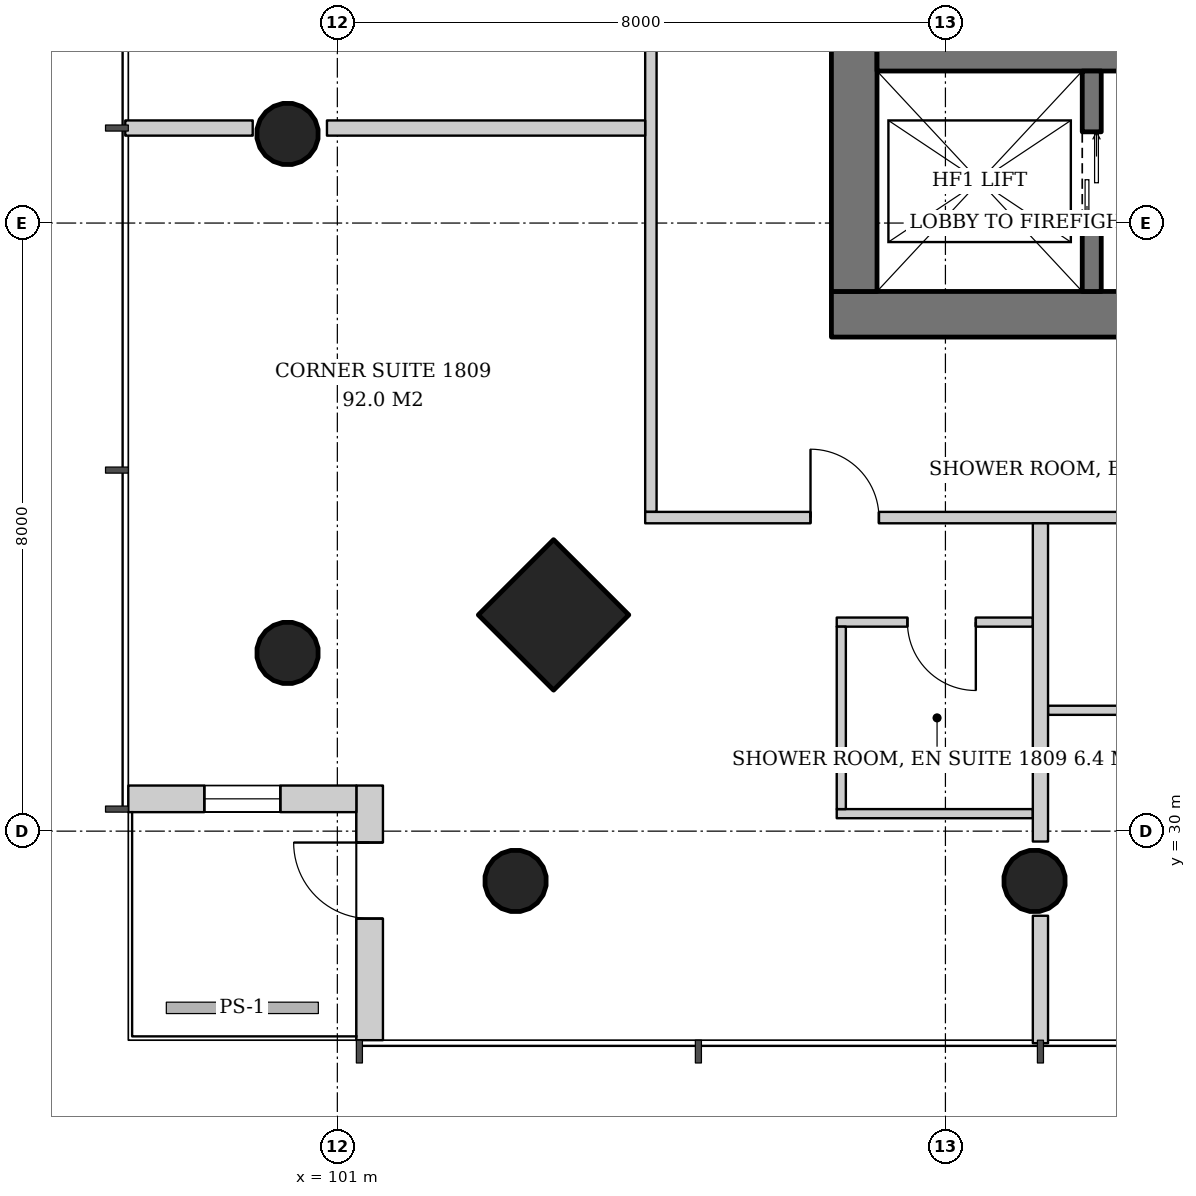
"""IFC4 building model, lengths in metres.
Left out: names, types, materials, properties, quantities, classifications, styles, units other than length and angle.
Written with IfcOpenShell. Run it as: python <this file> out.ifc"""

import sys

from ifc_helpers import new_model, si_unit, direction, frame, frame_2d, origin, origin_2d, place, context, subcontext, project, spatial, rectangle, hollow_circle, extrude, element, fill, save


model = new_model("IFC4")
c1 = context("Model", 3, precision=1e-05, world=origin(), true_north=direction((0.0, 1.0)))
c2 = subcontext(c1, "Body", "Model", "MODEL_VIEW")
j1 = project(units=[si_unit("LENGTHUNIT", "METRE"), si_unit("PLANEANGLEUNIT", "RADIAN")], contexts=[c1])
p1 = place(None, origin())
s1 = spatial("IfcSite", under=j1, at=p1, CompositionType="ELEMENT")
p2 = place(p1, origin())
s2 = spatial("IfcBuilding", under=s1, at=p2, CompositionType="ELEMENT")
p3 = place(p2, frame((0.0, 0.0, 74.2)))
s3 = spatial("IfcBuildingStorey", under=s2, at=p3, CompositionType="ELEMENT", Elevation=74.2)
p4 = place(p3, frame((103.793, 32.793, 0.0), z_axis=(0.042965756413, 0.042965756413, 0.998152236661), x_axis=(-0.707106781187, 0.707106781187, 0.0)))
e1 = element("IfcColumn", 1, at=p4, inside=s3, PredefinedType="COLUMN", context=c2, shape_type="SweptSolid", body=[
    extrude(rectangle(XDim=1.4, YDim=1.4, at=origin_2d()), origin(), (0.0, 0.0, 1.0), 3.807),
])
p5 = place(p3, frame((100.293, 32.293, 0.0), z_axis=(0.042965756413, 0.042965756413, 0.998152236661), x_axis=(-0.707106781187, 0.707106781187, 0.0)))
e2 = element("IfcColumn", 2, at=p5, inside=s3, PredefinedType="COLUMN", context=c2, shape_type="SweptSolid", body=[
    extrude(hollow_circle(Radius=0.406, WallThickness=0.03, at=origin_2d()), origin(), (0.0, 0.0, 1.0), 3.807),
])
p6 = place(p3, frame((100.293, 39.146, 0.0), z_axis=(0.042995471882, 0.021561908287, 0.998842566929), x_axis=(-0.448280611873, 0.89389288677, 0.0)))
e3 = element("IfcColumn", 3, at=p6, inside=s3, PredefinedType="COLUMN", context=c2, shape_type="SweptSolid", body=[
    extrude(hollow_circle(Radius=0.406, WallThickness=0.03, at=origin_2d()), origin(), (0.0, 0.0, 1.0), 3.804),
])
p7 = place(p3, frame((103.293, 29.293, 0.0), z_axis=(0.042965756413, 0.042965756413, 0.998152236661), x_axis=(-0.707106781187, 0.707106781187, 0.0)))
e4 = element("IfcColumn", 4, at=p7, inside=s3, PredefinedType="COLUMN", context=c2, shape_type="SweptSolid", body=[
    extrude(hollow_circle(Radius=0.406, WallThickness=0.03, at=origin_2d()), origin(), (0.0, 0.0, 1.0), 3.807),
])
p8 = place(p3, frame((110.146, 29.293, 0.0), z_axis=(0.021561908287, 0.042995471882, 0.998842566929), x_axis=(-0.89389288677, 0.448280611873, 0.0)))
e5 = element("IfcColumn", 5, at=p8, inside=s3, PredefinedType="COLUMN", context=c2, shape_type="SweptSolid", body=[
    extrude(hollow_circle(Radius=0.406, WallThickness=0.03, at=origin_2d()), origin(), (0.0, 0.0, 1.0), 3.804),
])
p9 = place(p3, frame((107.5, 36.8, 0.0), z_axis=(0.0, 0.0, 1.0), x_axis=(1.0, 0.0, 0.0)))
e6 = element("IfcWall", 6, at=p9, inside=s3, PredefinedType="SHEAR", context=c2, shape_type="SweptSolid", body=[
    extrude(rectangle(XDim=19.0, YDim=0.6, at=frame_2d((9.5, 0.0))), origin(), (0.0, 0.0, 1.0), 3.8),
])
p10 = place(p9, frame((3.9, 0.0, 0.0)))
e7 = element("IfcOpeningElement", 7, at=p10, cuts=e6, PredefinedType="OPENING", context=c2, shape_type="SweptSolid", body=[
    extrude(rectangle(XDim=1.0, YDim=2.1, at=frame_2d((0.5, 1.05))), frame((0.0, 0.31, 0.0), z_axis=(0.0, -1.0, 0.0), x_axis=(1.0, 0.0, 0.0)), (0.0, 0.0, 1.0), 0.62),
])
p11 = place(p9, frame((14.153, 0.0, 0.0)))
e8 = element("IfcOpeningElement", 8, at=p11, cuts=e6, PredefinedType="OPENING", context=c2, shape_type="SweptSolid", body=[
    extrude(rectangle(XDim=1.0, YDim=2.1, at=frame_2d((0.5, 1.05))), frame((0.0, 0.31, 0.0), z_axis=(0.0, -1.0, 0.0), x_axis=(1.0, 0.0, 0.0)), (0.0, 0.0, 1.0), 0.62),
])
p12 = place(p9, frame((16.2, 0.0, 0.0)))
e9 = element("IfcOpeningElement", 9, at=p12, cuts=e6, PredefinedType="OPENING", context=c2, shape_type="SweptSolid", body=[
    extrude(rectangle(XDim=1.0, YDim=2.1, at=frame_2d((0.5, 1.05))), frame((0.0, 0.31, 0.0), z_axis=(0.0, -1.0, 0.0), x_axis=(1.0, 0.0, 0.0)), (0.0, 0.0, 1.0), 0.62),
])
p13 = place(p3, frame((107.8, 37.1, 0.0), z_axis=(0.0, 0.0, 1.0), x_axis=(0.0, 1.0, 0.0)))
e10 = element("IfcWall", 10, at=p13, inside=s3, PredefinedType="SHEAR", context=c2, shape_type="SweptSolid", body=[
    extrude(rectangle(XDim=17.8, YDim=0.6, at=frame_2d((8.9, 0.0))), origin(), (0.0, 0.0, 1.0), 3.8),
])
p14 = place(p13, frame((8.0, 0.0, 0.0)))
e11 = element("IfcOpeningElement", 11, at=p14, cuts=e10, PredefinedType="OPENING", context=c2, shape_type="SweptSolid", body=[
    extrude(rectangle(XDim=1.8, YDim=2.4, at=frame_2d((0.9, 1.2))), frame((0.0, 0.31, 0.0), z_axis=(0.0, -1.0, 0.0), x_axis=(1.0, 0.0, 0.0)), (0.0, 0.0, 1.0), 0.62),
])
p15 = place(p3, frame((108.1, 40.2, 0.0), z_axis=(0.0, 0.0, 1.0), x_axis=(1.0, 0.0, 0.0)))
e12 = element("IfcWall", 12, at=p15, inside=s3, PredefinedType="SHEAR", context=c2, shape_type="SweptSolid", body=[
    extrude(rectangle(XDim=17.8, YDim=0.4, at=frame_2d((8.9, 0.0))), origin(), (0.0, 0.0, 1.0), 3.8),
])
p16 = place(p3, frame((101.425, 27.25, 0.0), z_axis=(0.0, 0.0, 1.0), x_axis=(0.0, 1.0, 0.0)))
e13 = element("IfcWall", 13, at=p16, inside=s3, PredefinedType="SOLIDWALL", context=c2, shape_type="SweptSolid", body=[
    extrude(rectangle(XDim=3.35, YDim=0.35, at=frame_2d((1.675, 0.0))), origin(), (0.0, 0.0, 1.0), 3.6),
])
p17 = place(p16, frame((1.6, 0.0, 0.0)))
e14 = element("IfcOpeningElement", 14, at=p17, cuts=e13, PredefinedType="OPENING", context=c2, shape_type="SweptSolid", body=[
    extrude(rectangle(XDim=1.0, YDim=2.4, at=frame_2d((0.5, 1.2))), frame((0.0, 0.185, 0.0), z_axis=(0.0, -1.0, 0.0), x_axis=(1.0, 0.0, 0.0)), (0.0, 0.0, 1.0), 0.37),
])
p18 = place(p3, frame((101.25, 30.425, 0.0), z_axis=(0.0, 0.0, 1.0), x_axis=(-1.0, 0.0, 0.0)))
e15 = element("IfcWall", 15, at=p18, inside=s3, PredefinedType="SOLIDWALL", context=c2, shape_type="SweptSolid", body=[
    extrude(rectangle(XDim=3.0, YDim=0.35, at=frame_2d((1.5, 0.0))), origin(), (0.0, 0.0, 1.0), 3.6),
])
p19 = place(p18, frame((1.0, 0.0, 0.9)))
e16 = element("IfcOpeningElement", 16, at=p19, cuts=e15, PredefinedType="OPENING", context=c2, shape_type="SweptSolid", body=[
    extrude(rectangle(XDim=1.0, YDim=2.4, at=frame_2d((0.5, 1.2))), frame((0.0, 0.185, 0.0), z_axis=(0.0, -1.0, 0.0), x_axis=(1.0, 0.0, 0.0)), (0.0, 0.0, 1.0), 0.37),
])
p20 = place(p3, frame((110.925, 37.1, 0.0), z_axis=(0.0, 0.0, 1.0), x_axis=(0.0, 1.0, 0.0)))
e17 = element("IfcWall", 17, at=p20, inside=s3, PredefinedType="SHEAR", context=c2, shape_type="SweptSolid", body=[
    extrude(rectangle(XDim=2.9, YDim=0.25, at=frame_2d((1.45, 0.0))), origin(), (0.0, 0.0, 1.0), 3.8),
])
p21 = place(p20, frame((0.8, 0.0, 0.0)))
e18 = element("IfcOpeningElement", 18, at=p21, cuts=e17, PredefinedType="OPENING", context=c2, shape_type="SweptSolid", body=[
    extrude(rectangle(XDim=1.3, YDim=2.2, at=frame_2d((0.65, 1.1))), frame((0.0, 0.135, 0.0), z_axis=(0.0, -1.0, 0.0), x_axis=(1.0, 0.0, 0.0)), (0.0, 0.0, 1.0), 0.27),
])
p22 = place(p3, frame((105.125, 57.95, 0.0), z_axis=(0.0, 0.0, 1.0), x_axis=(0.0, -1.0, 0.0)))
e19 = element("IfcWall", 19, at=p22, inside=s3, PredefinedType="PARTITIONING", context=c2, shape_type="SweptSolid", body=[
    extrude(rectangle(XDim=23.75, YDim=0.15, at=frame_2d((11.875, 0.0))), origin(), (0.0, 0.0, 1.0), 2.8),
])
p23 = place(p22, frame((2.175, 0.0, 0.0)))
e20 = element("IfcOpeningElement", 20, at=p23, cuts=e19, PredefinedType="OPENING", context=c2, shape_type="SweptSolid", body=[
    extrude(rectangle(XDim=0.9, YDim=2.1, at=frame_2d((0.45, 1.05))), frame((0.0, 0.085, 0.0), z_axis=(0.0, -1.0, 0.0), x_axis=(1.0, 0.0, 0.0)), (0.0, 0.0, 1.0), 0.17),
])
p24 = place(p22, frame((7.9, 0.0, 0.0)))
e21 = element("IfcOpeningElement", 21, at=p24, cuts=e19, PredefinedType="OPENING", context=c2, shape_type="SweptSolid", body=[
    extrude(rectangle(XDim=1.0, YDim=2.1, at=frame_2d((0.5, 1.05))), frame((0.0, 0.085, 0.0), z_axis=(0.0, -1.0, 0.0), x_axis=(1.0, 0.0, 0.0)), (0.0, 0.0, 1.0), 0.17),
])
p25 = place(p22, frame((12.45, 0.0, 0.0)))
e22 = element("IfcOpeningElement", 22, at=p25, cuts=e19, PredefinedType="OPENING", context=c2, shape_type="SweptSolid", body=[
    extrude(rectangle(XDim=0.9, YDim=2.1, at=frame_2d((0.45, 1.05))), frame((0.0, 0.085, 0.0), z_axis=(0.0, -1.0, 0.0), x_axis=(1.0, 0.0, 0.0)), (0.0, 0.0, 1.0), 0.17),
])
p26 = place(p3, frame((105.05, 39.25, 0.0), z_axis=(0.0, 0.0, 1.0), x_axis=(-1.0, 0.0, 0.0)))
e23 = element("IfcWall", 23, at=p26, inside=s3, PredefinedType="PARTITIONING", context=c2, shape_type="SweptSolid", body=[
    extrude(rectangle(XDim=4.187, YDim=0.2, at=frame_2d((2.093, 0.0))), origin(), (0.0, 0.0, 1.0), 3.6),
])
p27 = place(p3, frame((99.887, 39.25, 0.0), z_axis=(0.0, 0.0, 1.0), x_axis=(-1.0, 0.0, 0.0)))
e24 = element("IfcWall", 24, at=p27, inside=s3, PredefinedType="PARTITIONING", context=c2, shape_type="SweptSolid", body=[
    extrude(rectangle(XDim=1.677, YDim=0.2, at=frame_2d((0.838, 0.0))), origin(), (0.0, 0.0, 1.0), 3.6),
])
p28 = place(p3, frame((110.15, 32.75, 0.0), z_axis=(0.0, 0.0, 1.0), x_axis=(-1.0, 0.0, 0.0)))
e25 = element("IfcWall", 25, at=p28, inside=s3, PredefinedType="PARTITIONING", context=c2, shape_type="SweptSolid", body=[
    extrude(rectangle(XDim=2.58, YDim=0.12, at=frame_2d((1.29, 0.0))), origin(), (0.0, 0.0, 1.0), 2.8),
])
p29 = place(p28, frame((0.75, 0.0, 0.0)))
e26 = element("IfcOpeningElement", 26, at=p29, cuts=e25, PredefinedType="OPENING", context=c2, shape_type="SweptSolid", body=[
    extrude(rectangle(XDim=0.9, YDim=2.1, at=frame_2d((0.45, 1.05))), frame((0.0, 0.07, 0.0), z_axis=(0.0, -1.0, 0.0), x_axis=(1.0, 0.0, 0.0)), (0.0, 0.0, 1.0), 0.14),
])
p30 = place(p3, frame((110.15, 30.23, 0.0), z_axis=(0.0, 0.0, 1.0), x_axis=(-1.0, 0.0, 0.0)))
e27 = element("IfcWall", 27, at=p30, inside=s3, PredefinedType="PARTITIONING", context=c2, shape_type="SweptSolid", body=[
    extrude(rectangle(XDim=2.58, YDim=0.12, at=frame_2d((1.29, 0.0))), origin(), (0.0, 0.0, 1.0), 2.8),
])
p31 = place(p3, frame((107.63, 32.69, 0.0), z_axis=(0.0, 0.0, 1.0), x_axis=(0.0, -1.0, 0.0)))
e28 = element("IfcWall", 28, at=p31, inside=s3, PredefinedType="PARTITIONING", context=c2, shape_type="SweptSolid", body=[
    extrude(rectangle(XDim=2.4, YDim=0.12, at=frame_2d((1.2, 0.0))), origin(), (0.0, 0.0, 1.0), 2.8),
])
p32 = place(p3, frame((110.35, 31.59, 0.0), z_axis=(0.0, 0.0, 1.0), x_axis=(1.0, 0.0, 0.0)))
e29 = element("IfcWall", 29, at=p32, inside=s3, PredefinedType="PARTITIONING", context=c2, shape_type="SweptSolid", body=[
    extrude(rectangle(XDim=2.42, YDim=0.12, at=frame_2d((1.21, 0.0))), origin(), (0.0, 0.0, 1.0), 2.847),
])
p33 = place(p3, frame((105.05, 34.125, 0.0), z_axis=(0.0, 0.0, 1.0), x_axis=(1.0, 0.0, 0.0)))
e30 = element("IfcWall", 30, at=p33, inside=s3, PredefinedType="PARTITIONING", context=c2, shape_type="SweptSolid", body=[
    extrude(rectangle(XDim=23.75, YDim=0.15, at=frame_2d((11.875, 0.0))), origin(), (0.0, 0.0, 1.0), 2.8),
])
p34 = place(p33, frame((2.175, 0.0, 0.0)))
e31 = element("IfcOpeningElement", 31, at=p34, cuts=e30, PredefinedType="OPENING", context=c2, shape_type="SweptSolid", body=[
    extrude(rectangle(XDim=0.9, YDim=2.1, at=frame_2d((0.45, 1.05))), frame((0.0, 0.085, 0.0), z_axis=(0.0, -1.0, 0.0), x_axis=(1.0, 0.0, 0.0)), (0.0, 0.0, 1.0), 0.17),
])
p35 = place(p33, frame((7.95, 0.0, 0.0)))
e32 = element("IfcOpeningElement", 32, at=p35, cuts=e30, PredefinedType="OPENING", context=c2, shape_type="SweptSolid", body=[
    extrude(rectangle(XDim=0.9, YDim=2.1, at=frame_2d((0.45, 1.05))), frame((0.0, 0.085, 0.0), z_axis=(0.0, -1.0, 0.0), x_axis=(1.0, 0.0, 0.0)), (0.0, 0.0, 1.0), 0.17),
])
p36 = place(p33, frame((10.55, 0.0, 0.0)))
e33 = element("IfcOpeningElement", 33, at=p36, cuts=e30, PredefinedType="OPENING", context=c2, shape_type="SweptSolid", body=[
    extrude(rectangle(XDim=0.9, YDim=2.1, at=frame_2d((0.45, 1.05))), frame((0.0, 0.085, 0.0), z_axis=(0.0, -1.0, 0.0), x_axis=(1.0, 0.0, 0.0)), (0.0, 0.0, 1.0), 0.17),
])
p37 = place(p33, frame((16.95, 0.0, 0.0)))
e34 = element("IfcOpeningElement", 34, at=p37, cuts=e30, PredefinedType="OPENING", context=c2, shape_type="SweptSolid", body=[
    extrude(rectangle(XDim=0.9, YDim=2.1, at=frame_2d((0.45, 1.05))), frame((0.0, 0.085, 0.0), z_axis=(0.0, -1.0, 0.0), x_axis=(1.0, 0.0, 0.0)), (0.0, 0.0, 1.0), 0.17),
])
p38 = place(p3, frame((110.25, 34.05, 0.0), z_axis=(0.0, 0.0, 1.0), x_axis=(0.0, -1.0, 0.0)))
e35 = element("IfcWall", 35, at=p38, inside=s3, PredefinedType="PARTITIONING", context=c2, shape_type="SweptSolid", body=[
    extrude(rectangle(XDim=4.187, YDim=0.2, at=frame_2d((2.093, 0.0))), origin(), (0.0, 0.0, 1.0), 3.6),
])
p39 = place(p3, frame((110.25, 28.887, 0.0), z_axis=(0.0, 0.0, 1.0), x_axis=(0.0, -1.0, 0.0)))
e36 = element("IfcWall", 36, at=p39, inside=s3, PredefinedType="PARTITIONING", context=c2, shape_type="SweptSolid", body=[
    extrude(rectangle(XDim=1.677, YDim=0.2, at=frame_2d((0.838, 0.0))), origin(), (0.0, 0.0, 1.0), 3.6),
])
p40 = place(p17, origin())
e37 = element("IfcDoor", 37, at=p40, inside=s3, OperationType="SINGLE_SWING_RIGHT", PredefinedType="DOOR", context=c2, shape_type="SweptSolid", body=[
    extrude(rectangle(XDim=1.0, YDim=2.4, at=frame_2d((0.5, 1.2))), frame((0.0, 0.025, 0.0), z_axis=(0.0, -1.0, 0.0), x_axis=(1.0, 0.0, 0.0)), (0.0, 0.0, 1.0), 0.05),
])
fill(e14, e37)
p41 = place(p19, origin())
e38 = element("IfcWindow", 38, at=p41, inside=s3, PartitioningType="SINGLE_PANEL", PredefinedType="WINDOW", context=c2, shape_type="SweptSolid", body=[
    extrude(rectangle(XDim=1.0, YDim=2.4, at=frame_2d((0.5, 1.2))), frame((0.0, 0.03, 0.0), z_axis=(0.0, -1.0, 0.0), x_axis=(1.0, 0.0, 0.0)), (0.0, 0.0, 1.0), 0.06),
])
fill(e16, e38)
p42 = place(p21, origin())
e39 = element("IfcDoor", 39, at=p42, inside=s3, OperationType="DOUBLE_DOOR_SLIDING", PredefinedType="DOOR", context=c2, shape_type="SweptSolid", body=[
    extrude(rectangle(XDim=1.3, YDim=2.2, at=frame_2d((0.65, 1.1))), frame((0.0, 0.025, 0.0), z_axis=(0.0, -1.0, 0.0), x_axis=(1.0, 0.0, 0.0)), (0.0, 0.0, 1.0), 0.05),
])
fill(e18, e39)
p43 = place(p29, origin())
e40 = element("IfcDoor", 40, at=p43, inside=s3, OperationType="SINGLE_SWING_LEFT", PredefinedType="DOOR", context=c2, shape_type="SweptSolid", body=[
    extrude(rectangle(XDim=0.9, YDim=2.1, at=frame_2d((0.45, 1.05))), frame((0.0, 0.025, 0.0), z_axis=(0.0, -1.0, 0.0), x_axis=(1.0, 0.0, 0.0)), (0.0, 0.0, 1.0), 0.05),
])
fill(e26, e40)
p44 = place(p34, origin())
e41 = element("IfcDoor", 41, at=p44, inside=s3, OperationType="SINGLE_SWING_LEFT", PredefinedType="DOOR", context=c2, shape_type="SweptSolid", body=[
    extrude(rectangle(XDim=0.9, YDim=2.1, at=frame_2d((0.45, 1.05))), frame((0.0, 0.025, 0.0), z_axis=(0.0, -1.0, 0.0), x_axis=(1.0, 0.0, 0.0)), (0.0, 0.0, 1.0), 0.05),
])
fill(e31, e41)
save(model, sys.argv[1])
